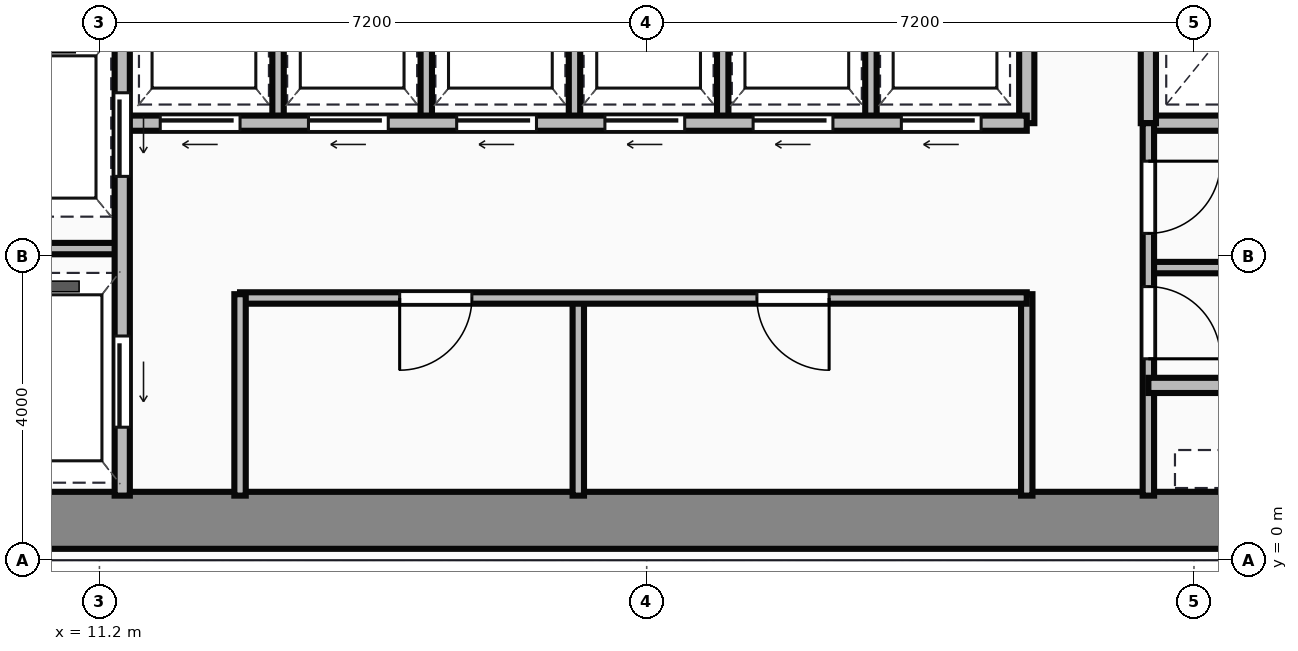
"""IFC4 building model, lengths in metres.
Left out: names, types, materials, properties, quantities, classifications, styles, units other than length and angle.
Written with IfcOpenShell. Run it as: python <this file> out.ifc"""

import sys

from ifc_helpers import new_model, si_unit, direction, frame, frame_2d, origin, place, context, subcontext, project, spatial, rectangle, extrude, source, transform, mapped, element, fill, save


model = new_model("IFC4")
c1 = context("Model", 3, precision=1e-05, world=origin(), true_north=direction((0.0, 1.0)))
c2 = subcontext(c1, "Body", "Model", "MODEL_VIEW")
j1 = project(units=[si_unit("LENGTHUNIT", "METRE"), si_unit("PLANEANGLEUNIT", "RADIAN")], contexts=[c1])
p1 = place(None, origin())
s1 = spatial("IfcSite", under=j1, at=p1, CompositionType="ELEMENT")
p2 = place(p1, origin())
s2 = spatial("IfcBuilding", under=s1, at=p2, CompositionType="ELEMENT")
p3 = place(p2, frame((0.0, 0.0, 125.15)))
s3 = spatial("IfcBuildingStorey", under=s2, at=p3, CompositionType="ELEMENT", Elevation=125.15)
m1 = source(origin(), c2, "Body", "SweptSolid", [
    extrude(rectangle(XDim=29.5, YDim=0.75, at=frame_2d((14.75, 0.0))), origin(), (0.0, 0.0, 1.0), 3.65),
])
p4 = place(p3, frame((4.5, 0.525, 0.0), z_axis=(0.0, 0.0, 1.0), x_axis=(1.0, 0.0, 0.0)))
e1 = element("IfcWall", 1, at=p4, inside=s3, PredefinedType="SHEAR", context=c2, shape_type="MappedRepresentation", body=[
    mapped(m1, transform((0.0, 0.0, 0.0))),
])
m2 = source(origin(), c2, "Body", "SweptSolid", [
    extrude(rectangle(XDim=9.6, YDim=0.2, at=frame_2d((4.8, 0.0))), origin(), (0.0, 0.0, 1.0), 3.4),
])
p5 = place(p3, frame((11.5, 0.85, 0.0), z_axis=(0.0, 0.0, 1.0), x_axis=(0.0, 1.0, 0.0)))
e2 = element("IfcWall", 2, at=p5, inside=s3, PredefinedType="PARTITIONING", context=c2, shape_type="MappedRepresentation", body=[
    mapped(m2, transform((0.0, 0.0, 0.0))),
])
p6 = place(p5, frame((4.2, 0.0, 0.0)))
e3 = element("IfcOpeningElement", 3, at=p6, cuts=e2, PredefinedType="OPENING", context=c2, shape_type="SweptSolid", body=[
    extrude(rectangle(XDim=1.1, YDim=2.15, at=frame_2d((0.55, 1.075))), frame((0.0, 0.11, 0.0), z_axis=(0.0, -1.0, 0.0), x_axis=(1.0, 0.0, 0.0)), (0.0, 0.0, 1.0), 0.22),
])
p7 = place(p5, frame((0.9, 0.0, 0.0)))
e4 = element("IfcOpeningElement", 4, at=p7, cuts=e2, PredefinedType="OPENING", context=c2, shape_type="SweptSolid", body=[
    extrude(rectangle(XDim=1.2, YDim=2.15, at=frame_2d((0.6, 1.075))), frame((0.0, 0.11, 0.0), z_axis=(0.0, -1.0, 0.0), x_axis=(1.0, 0.0, 0.0)), (0.0, 0.0, 1.0), 0.22),
])
m3 = source(origin(), c2, "Body", "SweptSolid", [
    extrude(rectangle(XDim=2.4, YDim=0.15, at=frame_2d((1.2, 0.0))), origin(), (0.0, 0.0, 1.0), 3.4),
])
p8 = place(p3, frame((9.1, 4.1, 0.0), z_axis=(0.0, 0.0, 1.0), x_axis=(1.0, 0.0, 0.0)))
e5 = element("IfcWall", 5, at=p8, inside=s3, PredefinedType="PARTITIONING", context=c2, shape_type="MappedRepresentation", body=[
    mapped(m3, transform((0.0, 0.0, 0.0))),
])
m4 = source(origin(), c2, "Body", "SweptSolid", [
    extrude(rectangle(XDim=2.65, YDim=0.15, at=frame_2d((1.325, 0.0))), origin(), (0.0, 0.0, 1.0), 3.4),
])
p9 = place(p3, frame((13.05, 0.85, 0.0), z_axis=(0.0, 0.0, 1.0), x_axis=(0.0, 1.0, 0.0)))
e6 = element("IfcWall", 6, at=p9, inside=s3, PredefinedType="PARTITIONING", context=c2, shape_type="MappedRepresentation", body=[
    mapped(m4, transform((0.0, 0.0, 0.0))),
])
m5 = source(origin(), c2, "Body", "SweptSolid", [
    extrude(rectangle(XDim=10.35, YDim=0.15, at=frame_2d((5.175, 0.0))), origin(), (0.0, 0.0, 1.0), 3.4),
])
p10 = place(p3, frame((13.05, 3.45, 0.0), z_axis=(0.0, 0.0, 1.0), x_axis=(1.0, 0.0, 0.0)))
e7 = element("IfcWall", 7, at=p10, inside=s3, PredefinedType="PARTITIONING", context=c2, shape_type="MappedRepresentation", body=[
    mapped(m5, transform((0.0, 0.0, 0.0))),
])
p11 = place(p10, frame((2.1, 0.0, 0.0)))
e8 = element("IfcOpeningElement", 8, at=p11, cuts=e7, PredefinedType="OPENING", context=c2, shape_type="SweptSolid", body=[
    extrude(rectangle(XDim=0.95, YDim=2.15, at=frame_2d((0.475, 1.075))), frame((0.0, 0.085, 0.0), z_axis=(0.0, -1.0, 0.0), x_axis=(1.0, 0.0, 0.0)), (0.0, 0.0, 1.0), 0.17),
])
p12 = place(p10, frame((6.8, 0.0, 0.0)))
e9 = element("IfcOpeningElement", 9, at=p12, cuts=e7, PredefinedType="OPENING", context=c2, shape_type="SweptSolid", body=[
    extrude(rectangle(XDim=0.95, YDim=2.15, at=frame_2d((0.475, 1.075))), frame((0.0, 0.085, 0.0), z_axis=(0.0, -1.0, 0.0), x_axis=(1.0, 0.0, 0.0)), (0.0, 0.0, 1.0), 0.17),
])
p13 = place(p3, frame((23.4, 0.85, 0.0), z_axis=(0.0, 0.0, 1.0), x_axis=(0.0, 1.0, 0.0)))
e10 = element("IfcWall", 10, at=p13, inside=s3, PredefinedType="PARTITIONING", context=c2, shape_type="MappedRepresentation", body=[
    mapped(m4, transform((0.0, 0.0, 0.0))),
])
m6 = source(origin(), c2, "Body", "SweptSolid", [
    extrude(rectangle(XDim=2.6, YDim=0.15, at=frame_2d((1.3, 0.0))), origin(), (0.0, 0.0, 1.0), 3.4),
])
p14 = place(p3, frame((17.5, 0.85, 0.0), z_axis=(0.0, 0.0, 1.0), x_axis=(0.0, 1.0, 0.0)))
e11 = element("IfcWall", 11, at=p14, inside=s3, PredefinedType="PARTITIONING", context=c2, shape_type="MappedRepresentation", body=[
    mapped(m6, transform((0.0, 0.0, 0.0))),
])
m7 = source(origin(), c2, "Body", "SweptSolid", [
    extrude(rectangle(XDim=11.85, YDim=0.2, at=frame_2d((5.925, 0.0))), origin(), (0.0, 0.0, 1.0), 3.4),
])
p15 = place(p3, frame((11.55, 5.75, 0.0), z_axis=(0.0, 0.0, 1.0), x_axis=(1.0, 0.0, 0.0)))
e12 = element("IfcWall", 12, at=p15, inside=s3, PredefinedType="PARTITIONING", context=c2, shape_type="MappedRepresentation", body=[
    mapped(m7, transform((0.0, 0.0, 0.0))),
])
p16 = place(p15, frame((0.45, 0.0, 0.0)))
e13 = element("IfcOpeningElement", 13, at=p16, cuts=e12, PredefinedType="OPENING", context=c2, shape_type="SweptSolid", body=[
    extrude(rectangle(XDim=1.05, YDim=2.15, at=frame_2d((0.525, 1.075))), frame((0.0, 0.11, 0.0), z_axis=(0.0, -1.0, 0.0), x_axis=(1.0, 0.0, 0.0)), (0.0, 0.0, 1.0), 0.22),
])
p17 = place(p15, frame((2.4, 0.0, 0.0)))
e14 = element("IfcOpeningElement", 14, at=p17, cuts=e12, PredefinedType="OPENING", context=c2, shape_type="SweptSolid", body=[
    extrude(rectangle(XDim=1.05, YDim=2.15, at=frame_2d((0.525, 1.075))), frame((0.0, 0.11, 0.0), z_axis=(0.0, -1.0, 0.0), x_axis=(1.0, 0.0, 0.0)), (0.0, 0.0, 1.0), 0.22),
])
p18 = place(p15, frame((4.35, 0.0, 0.0)))
e15 = element("IfcOpeningElement", 15, at=p18, cuts=e12, PredefinedType="OPENING", context=c2, shape_type="SweptSolid", body=[
    extrude(rectangle(XDim=1.05, YDim=2.15, at=frame_2d((0.525, 1.075))), frame((0.0, 0.11, 0.0), z_axis=(0.0, -1.0, 0.0), x_axis=(1.0, 0.0, 0.0)), (0.0, 0.0, 1.0), 0.22),
])
p19 = place(p15, frame((6.3, 0.0, 0.0)))
e16 = element("IfcOpeningElement", 16, at=p19, cuts=e12, PredefinedType="OPENING", context=c2, shape_type="SweptSolid", body=[
    extrude(rectangle(XDim=1.05, YDim=2.15, at=frame_2d((0.525, 1.075))), frame((0.0, 0.11, 0.0), z_axis=(0.0, -1.0, 0.0), x_axis=(1.0, 0.0, 0.0)), (0.0, 0.0, 1.0), 0.22),
])
p20 = place(p15, frame((8.25, 0.0, 0.0)))
e17 = element("IfcOpeningElement", 17, at=p20, cuts=e12, PredefinedType="OPENING", context=c2, shape_type="SweptSolid", body=[
    extrude(rectangle(XDim=1.05, YDim=2.15, at=frame_2d((0.525, 1.075))), frame((0.0, 0.11, 0.0), z_axis=(0.0, -1.0, 0.0), x_axis=(1.0, 0.0, 0.0)), (0.0, 0.0, 1.0), 0.22),
])
p21 = place(p15, frame((10.2, 0.0, 0.0)))
e18 = element("IfcOpeningElement", 18, at=p21, cuts=e12, PredefinedType="OPENING", context=c2, shape_type="SweptSolid", body=[
    extrude(rectangle(XDim=1.05, YDim=2.15, at=frame_2d((0.525, 1.075))), frame((0.0, 0.11, 0.0), z_axis=(0.0, -1.0, 0.0), x_axis=(1.0, 0.0, 0.0)), (0.0, 0.0, 1.0), 0.22),
])
m8 = source(origin(), c2, "Body", "SweptSolid", [
    extrude(rectangle(XDim=2.6, YDim=0.2, at=frame_2d((1.3, 0.0))), origin(), (0.0, 0.0, 1.0), 3.4),
])
p22 = place(p3, frame((23.4, 5.75, 0.0), z_axis=(0.0, 0.0, 1.0), x_axis=(0.0, 1.0, 0.0)))
e19 = element("IfcWall", 19, at=p22, inside=s3, PredefinedType="PARTITIONING", context=c2, shape_type="MappedRepresentation", body=[
    mapped(m8, transform((0.0, 0.0, 0.0))),
])
m9 = source(origin(), c2, "Body", "SweptSolid", [
    extrude(rectangle(XDim=2.5, YDim=0.15, at=frame_2d((1.25, 0.0))), origin(), (0.0, 0.0, 1.0), 3.4),
])
for number, where, z_axis, x_axis in (
    (20, (13.55, 5.8, 0.0), (0.0, 0.0, 1.0), (0.0, 1.0, 0.0)),
    (21, (15.5, 5.8, 0.0), (0.0, 0.0, 1.0), (0.0, 1.0, 0.0)),
    (22, (17.45, 5.8, 0.0), (0.0, 0.0, 1.0), (0.0, 1.0, 0.0)),
    (23, (19.4, 5.8, 0.0), (0.0, 0.0, 1.0), (0.0, 1.0, 0.0)),
    (24, (21.35, 5.8, 0.0), (0.0, 0.0, 1.0), (0.0, 1.0, 0.0)),
):
    element("IfcWall", number, at=place(p3, frame(where, z_axis=z_axis, x_axis=x_axis)), inside=s3, PredefinedType="PARTITIONING", context=c2, shape_type="MappedRepresentation", body=[
        mapped(m9, transform((0.0, 0.0, 0.0))),
    ])
m10 = source(origin(), c2, "Body", "SweptSolid", [
    extrude(rectangle(XDim=4.55, YDim=0.2, at=frame_2d((2.275, 0.0))), origin(), (0.0, 0.0, 1.0), 3.4),
])
p23 = place(p3, frame((25.0, 5.75, 0.0), z_axis=(0.0, 0.0, 1.0), x_axis=(1.0, 0.0, 0.0)))
e25 = element("IfcWall", 25, at=p23, inside=s3, PredefinedType="PARTITIONING", context=c2, shape_type="MappedRepresentation", body=[
    mapped(m10, transform((0.0, 0.0, 0.0))),
])
p24 = place(p3, frame((25.0, 5.75, 0.0), z_axis=(0.0, 0.0, 1.0), x_axis=(0.0, 1.0, 0.0)))
e26 = element("IfcWall", 26, at=p24, inside=s3, PredefinedType="PARTITIONING", context=c2, shape_type="MappedRepresentation", body=[
    mapped(m8, transform((0.0, 0.0, 0.0))),
])
m11 = source(origin(), c2, "Body", "SweptSolid", [
    extrude(rectangle(XDim=4.9, YDim=0.15, at=frame_2d((2.45, 0.0))), origin(), (0.0, 0.0, 1.0), 3.4),
])
p25 = place(p3, frame((25.0, 0.85, 0.0), z_axis=(0.0, 0.0, 1.0), x_axis=(0.0, 1.0, 0.0)))
e27 = element("IfcWall", 27, at=p25, inside=s3, PredefinedType="PARTITIONING", context=c2, shape_type="MappedRepresentation", body=[
    mapped(m11, transform((0.0, 0.0, 0.0))),
])
p26 = place(p25, frame((1.8, 0.0, 0.0)))
e28 = element("IfcOpeningElement", 28, at=p26, cuts=e27, PredefinedType="OPENING", context=c2, shape_type="SweptSolid", body=[
    extrude(rectangle(XDim=0.95, YDim=2.15, at=frame_2d((0.475, 1.075))), frame((0.0, 0.085, 0.0), z_axis=(0.0, -1.0, 0.0), x_axis=(1.0, 0.0, 0.0)), (0.0, 0.0, 1.0), 0.17),
])
p27 = place(p25, frame((3.45, 0.0, 0.0)))
e29 = element("IfcOpeningElement", 29, at=p27, cuts=e27, PredefinedType="OPENING", context=c2, shape_type="SweptSolid", body=[
    extrude(rectangle(XDim=0.95, YDim=2.15, at=frame_2d((0.475, 1.075))), frame((0.0, 0.085, 0.0), z_axis=(0.0, -1.0, 0.0), x_axis=(1.0, 0.0, 0.0)), (0.0, 0.0, 1.0), 0.17),
])
m12 = source(origin(), c2, "Body", "SweptSolid", [
    extrude(rectangle(XDim=2.4, YDim=0.2, at=frame_2d((1.2, 0.0))), origin(), (0.0, 0.0, 1.0), 3.4),
])
p28 = place(p3, frame((25.0, 2.3, 0.0), z_axis=(0.0, 0.0, 1.0), x_axis=(1.0, 0.0, 0.0)))
e30 = element("IfcWall", 30, at=p28, inside=s3, PredefinedType="PARTITIONING", context=c2, shape_type="MappedRepresentation", body=[
    mapped(m12, transform((0.0, 0.0, 0.0))),
])
m13 = source(origin(), c2, "Body", "SweptSolid", [
    extrude(rectangle(XDim=4.55, YDim=0.15, at=frame_2d((2.275, 0.0))), origin(), (0.0, 0.0, 1.0), 3.4),
])
p29 = place(p3, frame((25.0, 3.85, 0.0), z_axis=(0.0, 0.0, 1.0), x_axis=(1.0, 0.0, 0.0)))
e31 = element("IfcWall", 31, at=p29, inside=s3, PredefinedType="PARTITIONING", context=c2, shape_type="MappedRepresentation", body=[
    mapped(m13, transform((0.0, 0.0, 0.0))),
])
m14 = source(origin(), c2, "Body", "SweptSolid", [
    extrude(rectangle(XDim=1.1, YDim=2.15, at=frame_2d((0.55, 1.075))), frame((0.0, 0.025, 0.0), z_axis=(0.0, -1.0, 0.0), x_axis=(1.0, 0.0, 0.0)), (0.0, 0.0, 1.0), 0.05),
])
p30 = place(p6, frame((1.1, 0.0, 0.0), z_axis=(0.0, 0.0, 1.0), x_axis=(-1.0, 0.0, 0.0)))
e32 = element("IfcDoor", 32, at=p30, inside=s3, OperationType="SLIDING_TO_LEFT", PredefinedType="DOOR", context=c2, shape_type="MappedRepresentation", body=[
    mapped(m14, transform((0.0, 0.0, 0.0))),
])
fill(e3, e32)
m15 = source(origin(), c2, "Body", "SweptSolid", [
    extrude(rectangle(XDim=1.2, YDim=2.15, at=frame_2d((0.6, 1.075))), frame((0.0, 0.025, 0.0), z_axis=(0.0, -1.0, 0.0), x_axis=(1.0, 0.0, 0.0)), (0.0, 0.0, 1.0), 0.05),
])
p31 = place(p7, frame((1.2, 0.0, 0.0), z_axis=(0.0, 0.0, 1.0), x_axis=(-1.0, 0.0, 0.0)))
e33 = element("IfcDoor", 33, at=p31, inside=s3, OperationType="SLIDING_TO_LEFT", PredefinedType="DOOR", context=c2, shape_type="MappedRepresentation", body=[
    mapped(m15, transform((0.0, 0.0, 0.0))),
])
fill(e4, e33)
m16 = source(origin(), c2, "Body", "SweptSolid", [
    extrude(rectangle(XDim=0.95, YDim=2.15, at=frame_2d((0.475, 1.075))), frame((0.0, 0.025, 0.0), z_axis=(0.0, -1.0, 0.0), x_axis=(1.0, 0.0, 0.0)), (0.0, 0.0, 1.0), 0.05),
])
p32 = place(p11, origin())
e34 = element("IfcDoor", 34, at=p32, inside=s3, OperationType="SINGLE_SWING_LEFT", PredefinedType="DOOR", context=c2, shape_type="MappedRepresentation", body=[
    mapped(m16, transform((0.0, 0.0, 0.0))),
])
fill(e8, e34)
p33 = place(p12, origin())
e35 = element("IfcDoor", 35, at=p33, inside=s3, OperationType="SINGLE_SWING_RIGHT", PredefinedType="DOOR", context=c2, shape_type="MappedRepresentation", body=[
    mapped(m16, transform((0.0, 0.0, 0.0))),
])
fill(e9, e35)
m17 = source(origin(), c2, "Body", "SweptSolid", [
    extrude(rectangle(XDim=1.05, YDim=2.15, at=frame_2d((0.525, 1.075))), frame((0.0, 0.025, 0.0), z_axis=(0.0, -1.0, 0.0), x_axis=(1.0, 0.0, 0.0)), (0.0, 0.0, 1.0), 0.05),
])
p34 = place(p16, frame((1.05, 0.0, 0.0), z_axis=(0.0, 0.0, 1.0), x_axis=(-1.0, 0.0, 0.0)))
e36 = element("IfcDoor", 36, at=p34, inside=s3, OperationType="SLIDING_TO_LEFT", PredefinedType="DOOR", context=c2, shape_type="MappedRepresentation", body=[
    mapped(m17, transform((0.0, 0.0, 0.0))),
])
fill(e13, e36)
p35 = place(p17, frame((1.05, 0.0, 0.0), z_axis=(0.0, 0.0, 1.0), x_axis=(-1.0, 0.0, 0.0)))
e37 = element("IfcDoor", 37, at=p35, inside=s3, OperationType="SLIDING_TO_LEFT", PredefinedType="DOOR", context=c2, shape_type="MappedRepresentation", body=[
    mapped(m17, transform((0.0, 0.0, 0.0))),
])
fill(e14, e37)
p36 = place(p18, frame((1.05, 0.0, 0.0), z_axis=(0.0, 0.0, 1.0), x_axis=(-1.0, 0.0, 0.0)))
e38 = element("IfcDoor", 38, at=p36, inside=s3, OperationType="SLIDING_TO_LEFT", PredefinedType="DOOR", context=c2, shape_type="MappedRepresentation", body=[
    mapped(m17, transform((0.0, 0.0, 0.0))),
])
fill(e15, e38)
p37 = place(p19, frame((1.05, 0.0, 0.0), z_axis=(0.0, 0.0, 1.0), x_axis=(-1.0, 0.0, 0.0)))
e39 = element("IfcDoor", 39, at=p37, inside=s3, OperationType="SLIDING_TO_LEFT", PredefinedType="DOOR", context=c2, shape_type="MappedRepresentation", body=[
    mapped(m17, transform((0.0, 0.0, 0.0))),
])
fill(e16, e39)
p38 = place(p20, frame((1.05, 0.0, 0.0), z_axis=(0.0, 0.0, 1.0), x_axis=(-1.0, 0.0, 0.0)))
e40 = element("IfcDoor", 40, at=p38, inside=s3, OperationType="SLIDING_TO_LEFT", PredefinedType="DOOR", context=c2, shape_type="MappedRepresentation", body=[
    mapped(m17, transform((0.0, 0.0, 0.0))),
])
fill(e17, e40)
p39 = place(p21, frame((1.05, 0.0, 0.0), z_axis=(0.0, 0.0, 1.0), x_axis=(-1.0, 0.0, 0.0)))
e41 = element("IfcDoor", 41, at=p39, inside=s3, OperationType="SLIDING_TO_LEFT", PredefinedType="DOOR", context=c2, shape_type="MappedRepresentation", body=[
    mapped(m17, transform((0.0, 0.0, 0.0))),
])
fill(e18, e41)
p40 = place(p26, origin())
e42 = element("IfcDoor", 42, at=p40, inside=s3, OperationType="SINGLE_SWING_LEFT", PredefinedType="DOOR", context=c2, shape_type="MappedRepresentation", body=[
    mapped(m16, transform((0.0, 0.0, 0.0))),
])
fill(e28, e42)
p41 = place(p27, origin())
e43 = element("IfcDoor", 43, at=p41, inside=s3, OperationType="SINGLE_SWING_RIGHT", PredefinedType="DOOR", context=c2, shape_type="MappedRepresentation", body=[
    mapped(m16, transform((0.0, 0.0, 0.0))),
])
fill(e29, e43)
save(model, sys.argv[1])
